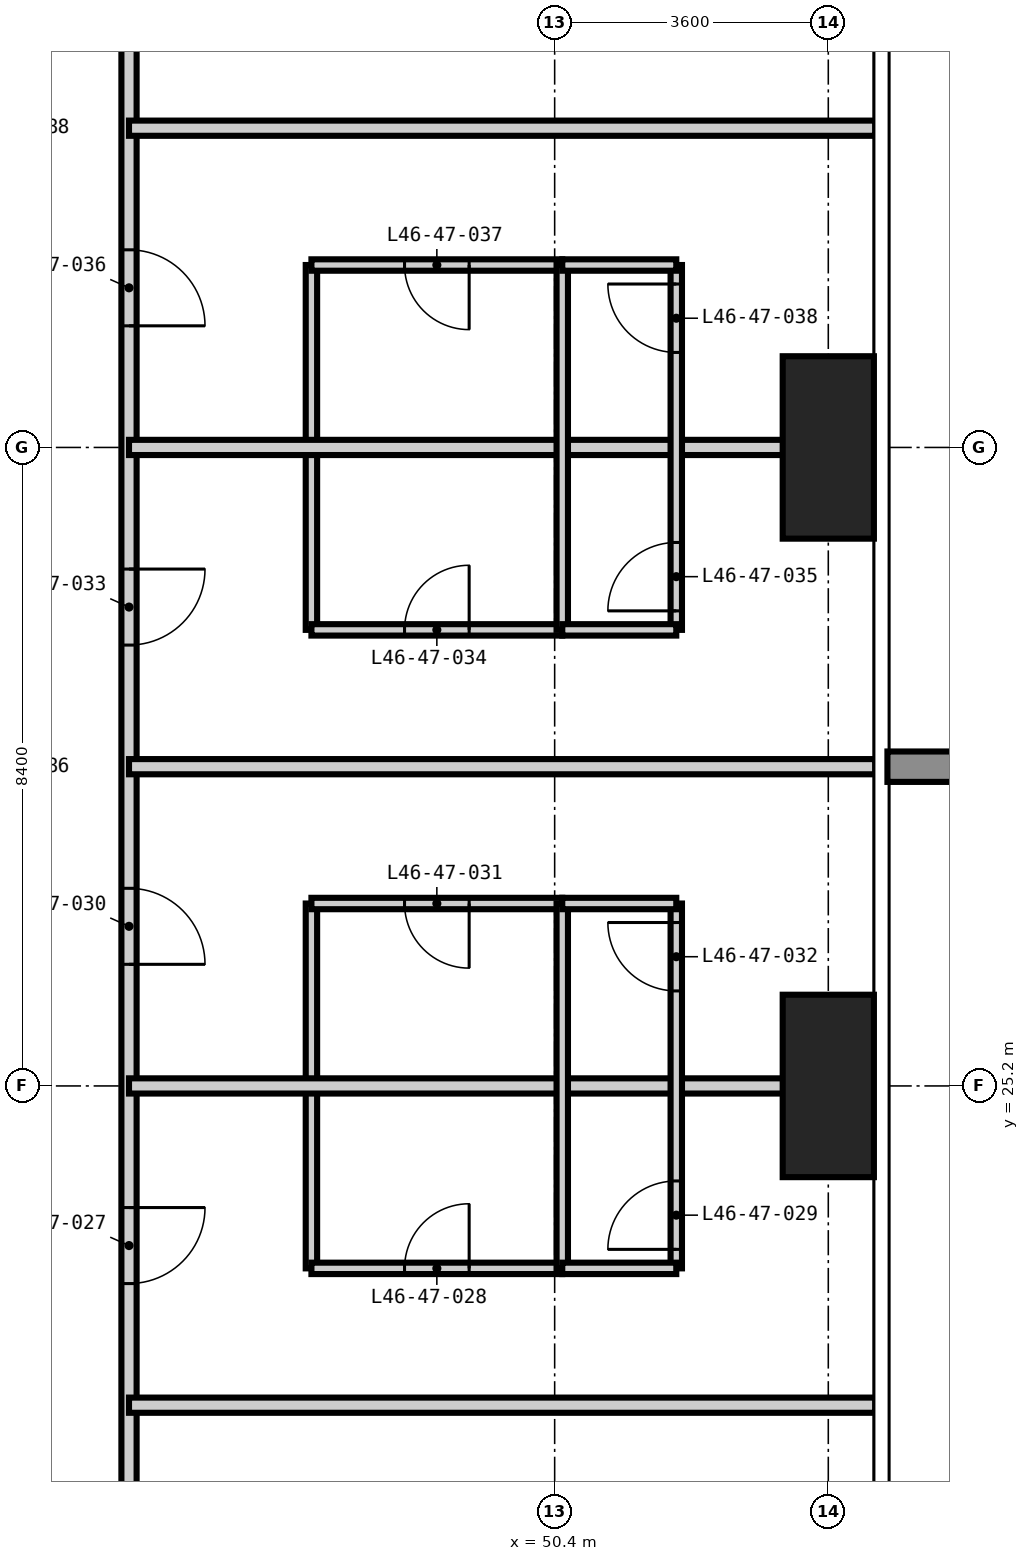
"""IFC4 building model, lengths in metres.
Left out: names, types, materials, properties, quantities, classifications, styles, units other than length and angle.
Written with IfcOpenShell. Run it as: python <this file> out.ifc"""

import sys

from ifc_helpers import new_model, si_unit, direction, frame, frame_2d, origin, origin_2d, place, context, subcontext, project, spatial, rectangle, extrude, element, fill, save


model = new_model("IFC4")
c1 = context("Model", 3, precision=1e-05, world=origin(), true_north=direction((0.0, 1.0)))
c2 = subcontext(c1, "Body", "Model", "MODEL_VIEW")
j1 = project(units=[si_unit("LENGTHUNIT", "METRE"), si_unit("PLANEANGLEUNIT", "RADIAN")], contexts=[c1])
p1 = place(None, origin())
s1 = spatial("IfcSite", under=j1, at=p1, CompositionType="ELEMENT")
p2 = place(p1, origin())
s2 = spatial("IfcBuilding", under=s1, at=p2, CompositionType="ELEMENT")
p3 = place(p2, frame((0.0, 0.0, 180.6)))
s3 = spatial("IfcBuildingStorey", under=s2, at=p3, CompositionType="ELEMENT", Elevation=180.6)
for number, where, z_axis, x_axis in (
    (1, (54.0, 25.2, -0.35), (0.0, 0.0, 1.0), (1.0, 0.0, 0.0)),
    (2, (54.0, 33.6, -0.35), (0.0, 0.0, 1.0), (1.0, 0.0, 0.0)),
):
    element("IfcColumn", number, at=place(p3, frame(where, z_axis=z_axis, x_axis=x_axis)), inside=s3, PredefinedType="COLUMN", context=c2, shape_type="SweptSolid", body=[
        extrude(rectangle(XDim=1.2, YDim=2.4, at=origin_2d()), origin(), (0.0, 0.0, 1.0), 3.6),
    ])
for number, where, z_axis, x_axis in (
    (3, (47.2, 22.8, 0.0), (0.0, 0.0, 1.0), (0.0, 1.0, 0.0)),
    (4, (47.2, 31.2, 0.0), (0.0, 0.0, 1.0), (0.0, 1.0, 0.0)),
):
    element("IfcWall", number, at=place(p3, frame(where, z_axis=z_axis, x_axis=x_axis)), inside=s3, PredefinedType="PARTITIONING", context=c2, shape_type="SweptSolid", body=[
        extrude(rectangle(XDim=4.8, YDim=0.15, at=frame_2d((2.4, 0.0))), origin(), (0.0, 0.0, 1.0), 3.25),
    ])
p4 = place(p3, frame((47.2, 22.8, 0.0), z_axis=(0.0, 0.0, 1.0), x_axis=(1.0, 0.0, 0.0)))
e5 = element("IfcWall", 5, at=p4, inside=s3, PredefinedType="PARTITIONING", context=c2, shape_type="SweptSolid", body=[
    extrude(rectangle(XDim=3.3, YDim=0.15, at=frame_2d((1.65, 0.0))), origin(), (0.0, 0.0, 1.0), 3.25),
])
p5 = place(p4, frame((1.225, 0.0, 0.0)))
e6 = element("IfcOpeningElement", 6, at=p5, cuts=e5, PredefinedType="OPENING", context=c2, shape_type="SweptSolid", body=[
    extrude(rectangle(XDim=0.85, YDim=2.1, at=frame_2d((0.425, 1.05))), frame((0.0, 0.085, 0.0), z_axis=(0.0, -1.0, 0.0), x_axis=(1.0, 0.0, 0.0)), (0.0, 0.0, 1.0), 0.17),
])
p6 = place(p3, frame((47.2, 27.6, 0.0), z_axis=(0.0, 0.0, 1.0), x_axis=(1.0, 0.0, 0.0)))
e7 = element("IfcWall", 7, at=p6, inside=s3, PredefinedType="PARTITIONING", context=c2, shape_type="SweptSolid", body=[
    extrude(rectangle(XDim=3.3, YDim=0.15, at=frame_2d((1.65, 0.0))), origin(), (0.0, 0.0, 1.0), 3.25),
])
p7 = place(p6, frame((1.225, 0.0, 0.0)))
e8 = element("IfcOpeningElement", 8, at=p7, cuts=e7, PredefinedType="OPENING", context=c2, shape_type="SweptSolid", body=[
    extrude(rectangle(XDim=0.85, YDim=2.1, at=frame_2d((0.425, 1.05))), frame((0.0, 0.085, 0.0), z_axis=(0.0, -1.0, 0.0), x_axis=(1.0, 0.0, 0.0)), (0.0, 0.0, 1.0), 0.17),
])
p8 = place(p3, frame((47.2, 31.2, 0.0), z_axis=(0.0, 0.0, 1.0), x_axis=(1.0, 0.0, 0.0)))
e9 = element("IfcWall", 9, at=p8, inside=s3, PredefinedType="PARTITIONING", context=c2, shape_type="SweptSolid", body=[
    extrude(rectangle(XDim=3.3, YDim=0.15, at=frame_2d((1.65, 0.0))), origin(), (0.0, 0.0, 1.0), 3.25),
])
p9 = place(p8, frame((1.225, 0.0, 0.0)))
e10 = element("IfcOpeningElement", 10, at=p9, cuts=e9, PredefinedType="OPENING", context=c2, shape_type="SweptSolid", body=[
    extrude(rectangle(XDim=0.85, YDim=2.1, at=frame_2d((0.425, 1.05))), frame((0.0, 0.085, 0.0), z_axis=(0.0, -1.0, 0.0), x_axis=(1.0, 0.0, 0.0)), (0.0, 0.0, 1.0), 0.17),
])
p10 = place(p3, frame((47.2, 36.0, 0.0), z_axis=(0.0, 0.0, 1.0), x_axis=(1.0, 0.0, 0.0)))
e11 = element("IfcWall", 11, at=p10, inside=s3, PredefinedType="PARTITIONING", context=c2, shape_type="SweptSolid", body=[
    extrude(rectangle(XDim=3.3, YDim=0.15, at=frame_2d((1.65, 0.0))), origin(), (0.0, 0.0, 1.0), 3.25),
])
p11 = place(p10, frame((1.225, 0.0, 0.0)))
e12 = element("IfcOpeningElement", 12, at=p11, cuts=e11, PredefinedType="OPENING", context=c2, shape_type="SweptSolid", body=[
    extrude(rectangle(XDim=0.85, YDim=2.1, at=frame_2d((0.425, 1.05))), frame((0.0, 0.085, 0.0), z_axis=(0.0, -1.0, 0.0), x_axis=(1.0, 0.0, 0.0)), (0.0, 0.0, 1.0), 0.17),
])
p12 = place(p3, frame((44.8, 45.4, 0.0), z_axis=(0.0, 0.0, 1.0), x_axis=(0.0, -1.0, 0.0)))
e13 = element("IfcWall", 13, at=p12, inside=s3, PredefinedType="PARTITIONING", context=c2, shape_type="SweptSolid", body=[
    extrude(rectangle(XDim=30.8, YDim=0.2, at=frame_2d((15.4, 0.0))), origin(), (0.0, 0.0, 1.0), 3.25),
])
p13 = place(p12, frame((26.0, 0.0, 0.0)))
e14 = element("IfcOpeningElement", 14, at=p13, cuts=e13, PredefinedType="OPENING", context=c2, shape_type="SweptSolid", body=[
    extrude(rectangle(XDim=1.0, YDim=2.2, at=frame_2d((0.5, 1.1))), frame((0.0, 0.11, 0.0), z_axis=(0.0, -1.0, 0.0), x_axis=(1.0, 0.0, 0.0)), (0.0, 0.0, 1.0), 0.22),
])
p14 = place(p12, frame((21.8, 0.0, 0.0)))
e15 = element("IfcOpeningElement", 15, at=p14, cuts=e13, PredefinedType="OPENING", context=c2, shape_type="SweptSolid", body=[
    extrude(rectangle(XDim=1.0, YDim=2.2, at=frame_2d((0.5, 1.1))), frame((0.0, 0.11, 0.0), z_axis=(0.0, -1.0, 0.0), x_axis=(1.0, 0.0, 0.0)), (0.0, 0.0, 1.0), 0.22),
])
p15 = place(p12, frame((17.6, 0.0, 0.0)))
e16 = element("IfcOpeningElement", 16, at=p15, cuts=e13, PredefinedType="OPENING", context=c2, shape_type="SweptSolid", body=[
    extrude(rectangle(XDim=1.0, YDim=2.2, at=frame_2d((0.5, 1.1))), frame((0.0, 0.11, 0.0), z_axis=(0.0, -1.0, 0.0), x_axis=(1.0, 0.0, 0.0)), (0.0, 0.0, 1.0), 0.22),
])
p16 = place(p12, frame((13.4, 0.0, 0.0)))
e17 = element("IfcOpeningElement", 17, at=p16, cuts=e13, PredefinedType="OPENING", context=c2, shape_type="SweptSolid", body=[
    extrude(rectangle(XDim=1.0, YDim=2.2, at=frame_2d((0.5, 1.1))), frame((0.0, 0.11, 0.0), z_axis=(0.0, -1.0, 0.0), x_axis=(1.0, 0.0, 0.0)), (0.0, 0.0, 1.0), 0.22),
])
p17 = place(p12, frame((9.2, 0.0, 0.0)))
e18 = element("IfcOpeningElement", 18, at=p17, cuts=e13, PredefinedType="OPENING", context=c2, shape_type="SweptSolid", body=[
    extrude(rectangle(XDim=1.0, YDim=2.2, at=frame_2d((0.5, 1.1))), frame((0.0, 0.11, 0.0), z_axis=(0.0, -1.0, 0.0), x_axis=(1.0, 0.0, 0.0)), (0.0, 0.0, 1.0), 0.22),
])
p18 = place(p12, frame((5.0, 0.0, 0.0)))
e19 = element("IfcOpeningElement", 19, at=p18, cuts=e13, PredefinedType="OPENING", context=c2, shape_type="SweptSolid", body=[
    extrude(rectangle(XDim=1.0, YDim=2.2, at=frame_2d((0.5, 1.1))), frame((0.0, 0.11, 0.0), z_axis=(0.0, -1.0, 0.0), x_axis=(1.0, 0.0, 0.0)), (0.0, 0.0, 1.0), 0.22),
])
p19 = place(p12, frame((29.2, 0.0, 0.0)))
e20 = element("IfcOpeningElement", 20, at=p19, cuts=e13, PredefinedType="OPENING", context=c2, shape_type="SweptSolid", body=[
    extrude(rectangle(XDim=1.0, YDim=2.2, at=frame_2d((0.5, 1.1))), frame((0.0, 0.11, 0.0), z_axis=(0.0, -1.0, 0.0), x_axis=(1.0, 0.0, 0.0)), (0.0, 0.0, 1.0), 0.22),
])
p20 = place(p12, frame((1.2, 0.0, 0.0)))
e21 = element("IfcOpeningElement", 21, at=p20, cuts=e13, PredefinedType="OPENING", context=c2, shape_type="SweptSolid", body=[
    extrude(rectangle(XDim=1.0, YDim=2.2, at=frame_2d((0.5, 1.1))), frame((0.0, 0.11, 0.0), z_axis=(0.0, -1.0, 0.0), x_axis=(1.0, 0.0, 0.0)), (0.0, 0.0, 1.0), 0.22),
])
for number, where, z_axis, x_axis in (
    (22, (44.8, 21.0, 0.0), (0.0, 0.0, 1.0), (1.0, 0.0, 0.0)),
    (23, (44.8, 25.2, 0.0), (0.0, 0.0, 1.0), (1.0, 0.0, 0.0)),
    (24, (44.8, 29.4, 0.0), (0.0, 0.0, 1.0), (1.0, 0.0, 0.0)),
    (25, (44.8, 33.6, 0.0), (0.0, 0.0, 1.0), (1.0, 0.0, 0.0)),
    (26, (44.8, 37.8, 0.0), (0.0, 0.0, 1.0), (1.0, 0.0, 0.0)),
):
    element("IfcWall", number, at=place(p3, frame(where, z_axis=z_axis, x_axis=x_axis)), inside=s3, PredefinedType="PARTITIONING", context=c2, shape_type="SweptSolid", body=[
        extrude(rectangle(XDim=9.818, YDim=0.2, at=frame_2d((4.909, 0.0))), origin(), (0.0, 0.0, 1.0), 3.25),
    ])
for number, where, z_axis, x_axis in (
    (27, (50.5, 22.8, 0.0), (0.0, 0.0, 1.0), (0.0, 1.0, 0.0)),
    (28, (50.5, 31.2, 0.0), (0.0, 0.0, 1.0), (0.0, 1.0, 0.0)),
):
    element("IfcWall", number, at=place(p3, frame(where, z_axis=z_axis, x_axis=x_axis)), inside=s3, PredefinedType="PARTITIONING", context=c2, shape_type="SweptSolid", body=[
        extrude(rectangle(XDim=4.8, YDim=0.15, at=frame_2d((2.4, 0.0))), origin(), (0.0, 0.0, 1.0), 3.25),
    ])
p21 = place(p3, frame((52.0, 22.8, 0.0), z_axis=(0.0, 0.0, 1.0), x_axis=(0.0, 1.0, 0.0)))
e29 = element("IfcWall", 29, at=p21, inside=s3, PredefinedType="PARTITIONING", context=c2, shape_type="SweptSolid", body=[
    extrude(rectangle(XDim=4.8, YDim=0.15, at=frame_2d((2.4, 0.0))), origin(), (0.0, 0.0, 1.0), 3.25),
])
p22 = place(p21, frame((0.25, 0.0, 0.0)))
e30 = element("IfcOpeningElement", 30, at=p22, cuts=e29, PredefinedType="OPENING", context=c2, shape_type="SweptSolid", body=[
    extrude(rectangle(XDim=0.9, YDim=2.1, at=frame_2d((0.45, 1.05))), frame((0.0, 0.085, 0.0), z_axis=(0.0, -1.0, 0.0), x_axis=(1.0, 0.0, 0.0)), (0.0, 0.0, 1.0), 0.17),
])
p23 = place(p21, frame((3.65, 0.0, 0.0)))
e31 = element("IfcOpeningElement", 31, at=p23, cuts=e29, PredefinedType="OPENING", context=c2, shape_type="SweptSolid", body=[
    extrude(rectangle(XDim=0.9, YDim=2.1, at=frame_2d((0.45, 1.05))), frame((0.0, 0.085, 0.0), z_axis=(0.0, -1.0, 0.0), x_axis=(1.0, 0.0, 0.0)), (0.0, 0.0, 1.0), 0.17),
])
p24 = place(p3, frame((52.0, 31.2, 0.0), z_axis=(0.0, 0.0, 1.0), x_axis=(0.0, 1.0, 0.0)))
e32 = element("IfcWall", 32, at=p24, inside=s3, PredefinedType="PARTITIONING", context=c2, shape_type="SweptSolid", body=[
    extrude(rectangle(XDim=4.8, YDim=0.15, at=frame_2d((2.4, 0.0))), origin(), (0.0, 0.0, 1.0), 3.25),
])
p25 = place(p24, frame((0.25, 0.0, 0.0)))
e33 = element("IfcOpeningElement", 33, at=p25, cuts=e32, PredefinedType="OPENING", context=c2, shape_type="SweptSolid", body=[
    extrude(rectangle(XDim=0.9, YDim=2.1, at=frame_2d((0.45, 1.05))), frame((0.0, 0.085, 0.0), z_axis=(0.0, -1.0, 0.0), x_axis=(1.0, 0.0, 0.0)), (0.0, 0.0, 1.0), 0.17),
])
p26 = place(p24, frame((3.65, 0.0, 0.0)))
e34 = element("IfcOpeningElement", 34, at=p26, cuts=e32, PredefinedType="OPENING", context=c2, shape_type="SweptSolid", body=[
    extrude(rectangle(XDim=0.9, YDim=2.1, at=frame_2d((0.45, 1.05))), frame((0.0, 0.085, 0.0), z_axis=(0.0, -1.0, 0.0), x_axis=(1.0, 0.0, 0.0)), (0.0, 0.0, 1.0), 0.17),
])
for number, where, z_axis, x_axis in (
    (35, (50.5, 22.8, 0.0), (0.0, 0.0, 1.0), (1.0, 0.0, 0.0)),
    (36, (50.5, 27.6, 0.0), (0.0, 0.0, 1.0), (1.0, 0.0, 0.0)),
    (37, (50.5, 31.2, 0.0), (0.0, 0.0, 1.0), (1.0, 0.0, 0.0)),
    (38, (50.5, 36.0, 0.0), (0.0, 0.0, 1.0), (1.0, 0.0, 0.0)),
):
    element("IfcWall", number, at=place(p3, frame(where, z_axis=z_axis, x_axis=x_axis)), inside=s3, PredefinedType="PARTITIONING", context=c2, shape_type="SweptSolid", body=[
        extrude(rectangle(XDim=1.5, YDim=0.15, at=frame_2d((0.75, 0.0))), origin(), (0.0, 0.0, 1.0), 3.25),
    ])
p27 = place(p14, origin())
e39 = element("IfcDoor", 39, at=p27, inside=s3, OperationType="SINGLE_SWING_LEFT", PredefinedType="DOOR", context=c2, shape_type="SweptSolid", body=[
    extrude(rectangle(XDim=1.0, YDim=2.2, at=frame_2d((0.5, 1.1))), frame((0.0, 0.025, 0.0), z_axis=(0.0, -1.0, 0.0), x_axis=(1.0, 0.0, 0.0)), (0.0, 0.0, 1.0), 0.05),
])
fill(e15, e39)
p28 = place(p5, origin())
e40 = element("IfcDoor", 40, at=p28, inside=s3, OperationType="SINGLE_SWING_RIGHT", PredefinedType="DOOR", context=c2, shape_type="SweptSolid", body=[
    extrude(rectangle(XDim=0.85, YDim=2.1, at=frame_2d((0.425, 1.05))), frame((0.0, 0.025, 0.0), z_axis=(0.0, -1.0, 0.0), x_axis=(1.0, 0.0, 0.0)), (0.0, 0.0, 1.0), 0.05),
])
fill(e6, e40)
p29 = place(p22, origin())
e41 = element("IfcDoor", 41, at=p29, inside=s3, OperationType="SINGLE_SWING_LEFT", PredefinedType="DOOR", context=c2, shape_type="SweptSolid", body=[
    extrude(rectangle(XDim=0.9, YDim=2.1, at=frame_2d((0.45, 1.05))), frame((0.0, 0.025, 0.0), z_axis=(0.0, -1.0, 0.0), x_axis=(1.0, 0.0, 0.0)), (0.0, 0.0, 1.0), 0.05),
])
fill(e30, e41)
p30 = place(p15, origin())
e42 = element("IfcDoor", 42, at=p30, inside=s3, OperationType="SINGLE_SWING_RIGHT", PredefinedType="DOOR", context=c2, shape_type="SweptSolid", body=[
    extrude(rectangle(XDim=1.0, YDim=2.2, at=frame_2d((0.5, 1.1))), frame((0.0, 0.025, 0.0), z_axis=(0.0, -1.0, 0.0), x_axis=(1.0, 0.0, 0.0)), (0.0, 0.0, 1.0), 0.05),
])
fill(e16, e42)
p31 = place(p7, frame((0.85, 0.0, 0.0), z_axis=(0.0, 0.0, 1.0), x_axis=(-1.0, 0.0, 0.0)))
e43 = element("IfcDoor", 43, at=p31, inside=s3, OperationType="SINGLE_SWING_LEFT", PredefinedType="DOOR", context=c2, shape_type="SweptSolid", body=[
    extrude(rectangle(XDim=0.85, YDim=2.1, at=frame_2d((0.425, 1.05))), frame((0.0, 0.025, 0.0), z_axis=(0.0, -1.0, 0.0), x_axis=(1.0, 0.0, 0.0)), (0.0, 0.0, 1.0), 0.05),
])
fill(e8, e43)
p32 = place(p23, origin())
e44 = element("IfcDoor", 44, at=p32, inside=s3, OperationType="SINGLE_SWING_RIGHT", PredefinedType="DOOR", context=c2, shape_type="SweptSolid", body=[
    extrude(rectangle(XDim=0.9, YDim=2.1, at=frame_2d((0.45, 1.05))), frame((0.0, 0.025, 0.0), z_axis=(0.0, -1.0, 0.0), x_axis=(1.0, 0.0, 0.0)), (0.0, 0.0, 1.0), 0.05),
])
fill(e31, e44)
p33 = place(p16, origin())
e45 = element("IfcDoor", 45, at=p33, inside=s3, OperationType="SINGLE_SWING_LEFT", PredefinedType="DOOR", context=c2, shape_type="SweptSolid", body=[
    extrude(rectangle(XDim=1.0, YDim=2.2, at=frame_2d((0.5, 1.1))), frame((0.0, 0.025, 0.0), z_axis=(0.0, -1.0, 0.0), x_axis=(1.0, 0.0, 0.0)), (0.0, 0.0, 1.0), 0.05),
])
fill(e17, e45)
p34 = place(p9, origin())
e46 = element("IfcDoor", 46, at=p34, inside=s3, OperationType="SINGLE_SWING_RIGHT", PredefinedType="DOOR", context=c2, shape_type="SweptSolid", body=[
    extrude(rectangle(XDim=0.85, YDim=2.1, at=frame_2d((0.425, 1.05))), frame((0.0, 0.025, 0.0), z_axis=(0.0, -1.0, 0.0), x_axis=(1.0, 0.0, 0.0)), (0.0, 0.0, 1.0), 0.05),
])
fill(e10, e46)
p35 = place(p25, origin())
e47 = element("IfcDoor", 47, at=p35, inside=s3, OperationType="SINGLE_SWING_LEFT", PredefinedType="DOOR", context=c2, shape_type="SweptSolid", body=[
    extrude(rectangle(XDim=0.9, YDim=2.1, at=frame_2d((0.45, 1.05))), frame((0.0, 0.025, 0.0), z_axis=(0.0, -1.0, 0.0), x_axis=(1.0, 0.0, 0.0)), (0.0, 0.0, 1.0), 0.05),
])
fill(e33, e47)
p36 = place(p17, origin())
e48 = element("IfcDoor", 48, at=p36, inside=s3, OperationType="SINGLE_SWING_RIGHT", PredefinedType="DOOR", context=c2, shape_type="SweptSolid", body=[
    extrude(rectangle(XDim=1.0, YDim=2.2, at=frame_2d((0.5, 1.1))), frame((0.0, 0.025, 0.0), z_axis=(0.0, -1.0, 0.0), x_axis=(1.0, 0.0, 0.0)), (0.0, 0.0, 1.0), 0.05),
])
fill(e18, e48)
p37 = place(p11, frame((0.85, 0.0, 0.0), z_axis=(0.0, 0.0, 1.0), x_axis=(-1.0, 0.0, 0.0)))
e49 = element("IfcDoor", 49, at=p37, inside=s3, OperationType="SINGLE_SWING_LEFT", PredefinedType="DOOR", context=c2, shape_type="SweptSolid", body=[
    extrude(rectangle(XDim=0.85, YDim=2.1, at=frame_2d((0.425, 1.05))), frame((0.0, 0.025, 0.0), z_axis=(0.0, -1.0, 0.0), x_axis=(1.0, 0.0, 0.0)), (0.0, 0.0, 1.0), 0.05),
])
fill(e12, e49)
p38 = place(p26, origin())
e50 = element("IfcDoor", 50, at=p38, inside=s3, OperationType="SINGLE_SWING_RIGHT", PredefinedType="DOOR", context=c2, shape_type="SweptSolid", body=[
    extrude(rectangle(XDim=0.9, YDim=2.1, at=frame_2d((0.45, 1.05))), frame((0.0, 0.025, 0.0), z_axis=(0.0, -1.0, 0.0), x_axis=(1.0, 0.0, 0.0)), (0.0, 0.0, 1.0), 0.05),
])
fill(e34, e50)
save(model, sys.argv[1])
